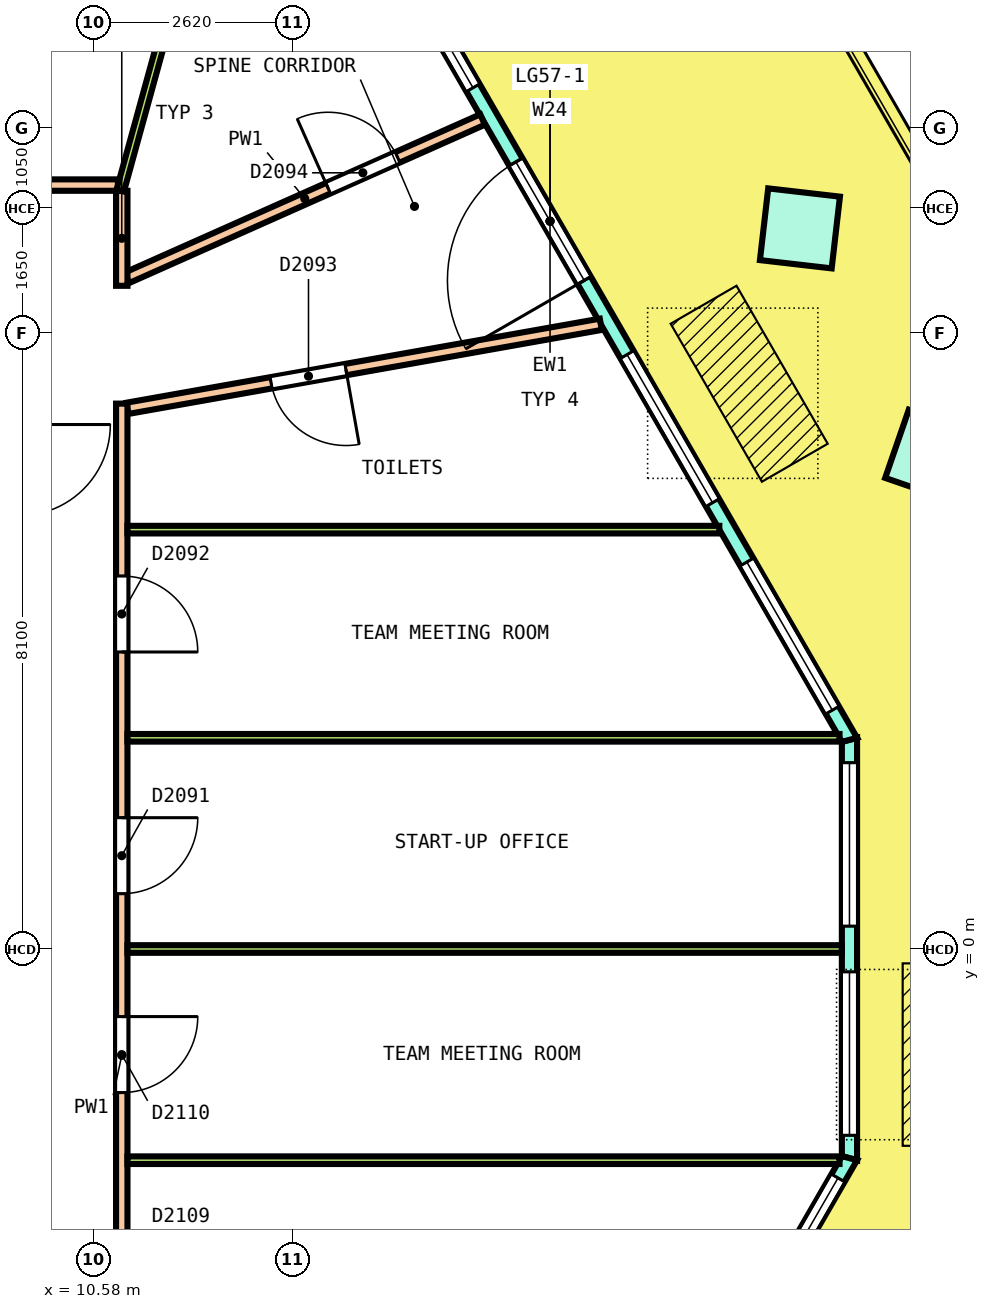
"""IFC4 building model, lengths in metres.
Left out: names, types, materials, properties, quantities, classifications, styles, units other than length and angle.
Written with IfcOpenShell. Run it as: python <this file> out.ifc"""

import sys

from ifc_helpers import new_model, si_unit, direction, frame, frame_2d, origin, origin_2d, place, context, subcontext, project, spatial, polyline, rectangle, outline, extrude, element, fill, save


model = new_model("IFC4")
c1 = context("Model", 3, precision=1e-05, world=origin(), true_north=direction((0.0, 1.0)))
c2 = subcontext(c1, "Body", "Model", "MODEL_VIEW")
j1 = project(units=[si_unit("LENGTHUNIT", "METRE"), si_unit("PLANEANGLEUNIT", "RADIAN")], contexts=[c1])
p1 = place(None, origin())
s1 = spatial("IfcSite", under=j1, at=p1, CompositionType="ELEMENT")
p2 = place(p1, origin())
s2 = spatial("IfcBuilding", under=s1, at=p2, CompositionType="ELEMENT")
p3 = place(p2, frame((0.0, 0.0, 263.0)))
s3 = spatial("IfcBuildingStorey", under=s2, at=p3, CompositionType="ELEMENT", Elevation=263.0)
p4 = place(p3, frame((21.598, 6.491, 0.0), z_axis=(0.021793949015, 0.025136579231, 0.999446434868), x_axis=(-0.500091550798, 0.865904279016, -0.010872920625)))
e1 = element("IfcColumn", 1, at=p4, inside=s3, PredefinedType="COLUMN", context=c2, shape_type="SweptSolid", body=[
    extrude(rectangle(XDim=0.95, YDim=0.95, at=origin_2d()), origin(), (0.0, 0.0, 1.0), 3.652),
])
p5 = place(p3, frame((19.872, 9.48, 0.0), z_axis=(0.025338523594, 0.018853466104, 0.999501128583), x_axis=(-0.501175757197, 0.865337954228, -0.003617370643)))
e2 = element("IfcColumn", 2, at=p5, inside=s3, PredefinedType="COLUMN", context=c2, shape_type="SweptSolid", body=[
    extrude(rectangle(XDim=0.95, YDim=0.95, at=origin_2d()), origin(), (0.0, 0.0, 1.0), 3.652),
])
p6 = place(p3, frame((20.524, -2.752, 0.0), z_axis=(0.0, 0.0, 1.0), x_axis=(0.0, 1.0, 0.0)))
e3 = element("IfcWall", 3, at=p6, inside=s3, PredefinedType="SOLIDWALL", context=c2, shape_type="SweptSolid", body=[
    extrude(outline(polyline([(-0.027, -0.1), (1.084, -0.1), (2.196, -0.1), (3.307, -0.1), (4.419, -0.1), (5.53, -0.1), (5.477, 0.1), (4.387, 0.1), (3.297, 0.1), (2.207, 0.1), (1.117, 0.1), (0.027, 0.1), (-0.027, -0.1)])), origin(), (0.0, 0.0, 1.0), 3.7),
])
p7 = place(p6, frame((0.301, 0.0, 0.1)))
e4 = element("IfcOpeningElement", 4, at=p7, cuts=e3, PredefinedType="OPENING", context=c2, shape_type="SweptSolid", body=[
    extrude(rectangle(XDim=2.15, YDim=2.75, at=frame_2d((1.075, 1.375))), frame((0.0, 0.11, 0.0), z_axis=(0.0, -1.0, 0.0), x_axis=(1.0, 0.0, 0.0)), (0.0, 0.0, 1.0), 0.22),
])
p8 = place(p6, frame((3.052, 0.0, 0.1)))
e5 = element("IfcOpeningElement", 5, at=p8, cuts=e3, PredefinedType="OPENING", context=c2, shape_type="SweptSolid", body=[
    extrude(rectangle(XDim=2.15, YDim=2.75, at=frame_2d((1.075, 1.375))), frame((0.0, 0.11, 0.0), z_axis=(0.0, -1.0, 0.0), x_axis=(1.0, 0.0, 0.0)), (0.0, 0.0, 1.0), 0.22),
])
p9 = place(p3, frame((20.524, 2.752, 0.0), z_axis=(0.0, 0.0, 1.0), x_axis=(-0.499993368965, 0.86602923218, 0.0)))
e6 = element("IfcWall", 6, at=p9, inside=s3, PredefinedType="SOLIDWALL", context=c2, shape_type="SweptSolid", body=[
    extrude(outline(polyline([(-0.027, -0.1), (1.027, -0.1), (2.081, -0.1), (3.135, -0.1), (4.189, -0.1), (5.244, -0.1), (6.298, -0.1), (7.352, -0.1), (8.406, -0.1), (9.46, -0.1), (10.514, -0.1), (11.568, -0.1), (12.622, -0.1), (13.676, -0.1), (14.73, -0.1), (15.784, -0.1), (15.731, 0.1), (14.684, 0.1), (13.637, 0.1), (12.59, 0.1), (11.543, 0.1), (10.496, 0.1), (9.449, 0.1), (8.402, 0.1), (7.355, 0.1), (6.308, 0.1), (5.261, 0.1), (4.215, 0.1), (3.168, 0.1), (2.121, 0.1), (1.074, 0.1), (0.027, 0.1), (-0.027, -0.1)])), origin(), (0.0, 0.0, 1.0), 3.7),
])
p10 = place(p9, frame((0.451, 0.0, 0.1)))
e7 = element("IfcOpeningElement", 7, at=p10, cuts=e6, PredefinedType="OPENING", context=c2, shape_type="SweptSolid", body=[
    extrude(rectangle(XDim=2.25, YDim=2.75, at=frame_2d((1.125, 1.375))), frame((0.0, 0.11, 0.0), z_axis=(0.0, -1.0, 0.0), x_axis=(1.0, 0.0, 0.0)), (0.0, 0.0, 1.0), 0.22),
])
p11 = place(p9, frame((3.602, 0.0, 0.1)))
e8 = element("IfcOpeningElement", 8, at=p11, cuts=e6, PredefinedType="OPENING", context=c2, shape_type="SweptSolid", body=[
    extrude(rectangle(XDim=2.25, YDim=2.75, at=frame_2d((1.125, 1.375))), frame((0.0, 0.11, 0.0), z_axis=(0.0, -1.0, 0.0), x_axis=(1.0, 0.0, 0.0)), (0.0, 0.0, 1.0), 0.22),
])
p12 = place(p9, frame((6.979, 0.0, 0.0)))
e9 = element("IfcOpeningElement", 9, at=p12, cuts=e6, PredefinedType="OPENING", context=c2, shape_type="SweptSolid", body=[
    extrude(rectangle(XDim=1.8, YDim=2.4, at=frame_2d((0.9, 1.2))), frame((0.0, 0.11, 0.0), z_axis=(0.0, -1.0, 0.0), x_axis=(1.0, 0.0, 0.0)), (0.0, 0.0, 1.0), 0.22),
])
p13 = place(p9, frame((6.979, 0.0, 2.55)))
e10 = element("IfcOpeningElement", 10, at=p13, cuts=e6, PredefinedType="OPENING", context=c2, shape_type="SweptSolid", body=[
    extrude(rectangle(XDim=1.8, YDim=0.3, at=frame_2d((0.9, 0.15))), frame((0.0, 0.11, 0.0), z_axis=(0.0, -1.0, 0.0), x_axis=(1.0, 0.0, 0.0)), (0.0, 0.0, 1.0), 0.22),
])
p14 = place(p9, frame((9.906, 0.0, 0.1)))
e11 = element("IfcOpeningElement", 11, at=p14, cuts=e6, PredefinedType="OPENING", context=c2, shape_type="SweptSolid", body=[
    extrude(rectangle(XDim=2.25, YDim=2.75, at=frame_2d((1.125, 1.375))), frame((0.0, 0.11, 0.0), z_axis=(0.0, -1.0, 0.0), x_axis=(1.0, 0.0, 0.0)), (0.0, 0.0, 1.0), 0.22),
])
p15 = place(p9, frame((13.057, 0.0, 0.1)))
e12 = element("IfcOpeningElement", 12, at=p15, cuts=e6, PredefinedType="OPENING", context=c2, shape_type="SweptSolid", body=[
    extrude(rectangle(XDim=2.25, YDim=2.75, at=frame_2d((1.125, 1.375))), frame((0.0, 0.11, 0.0), z_axis=(0.0, -1.0, 0.0), x_axis=(1.0, 0.0, 0.0)), (0.0, 0.0, 1.0), 0.22),
])
p16 = place(p3, frame((12.645, -16.398, 0.0), z_axis=(0.0, 0.0, 1.0), x_axis=(0.499993368965, 0.86602923218, 0.0)))
e13 = element("IfcWall", 13, at=p16, inside=s3, PredefinedType="SOLIDWALL", context=c2, shape_type="SweptSolid", body=[
    extrude(outline(polyline([(-0.027, -0.1), (1.027, -0.1), (2.081, -0.1), (3.135, -0.1), (4.189, -0.1), (5.244, -0.1), (6.298, -0.1), (7.352, -0.1), (8.406, -0.1), (9.46, -0.1), (10.514, -0.1), (11.568, -0.1), (12.622, -0.1), (13.676, -0.1), (14.73, -0.1), (15.784, -0.1), (15.731, 0.1), (14.684, 0.1), (13.637, 0.1), (12.59, 0.1), (11.543, 0.1), (10.496, 0.1), (9.449, 0.1), (8.402, 0.1), (7.355, 0.1), (6.308, 0.1), (5.261, 0.1), (4.215, 0.1), (3.168, 0.1), (2.121, 0.1), (1.074, 0.1), (0.027, 0.1), (-0.027, -0.1)])), origin(), (0.0, 0.0, 1.0), 3.7),
])
p17 = place(p16, frame((0.301, 0.0, 0.1)))
e14 = element("IfcOpeningElement", 14, at=p17, cuts=e13, PredefinedType="OPENING", context=c2, shape_type="SweptSolid", body=[
    extrude(rectangle(XDim=2.55, YDim=2.75, at=frame_2d((1.275, 1.375))), frame((0.0, 0.11, 0.0), z_axis=(0.0, -1.0, 0.0), x_axis=(1.0, 0.0, 0.0)), (0.0, 0.0, 1.0), 0.22),
])
p18 = place(p16, frame((3.452, 0.0, 0.1)))
e15 = element("IfcOpeningElement", 15, at=p18, cuts=e13, PredefinedType="OPENING", context=c2, shape_type="SweptSolid", body=[
    extrude(rectangle(XDim=2.55, YDim=2.75, at=frame_2d((1.275, 1.375))), frame((0.0, 0.11, 0.0), z_axis=(0.0, -1.0, 0.0), x_axis=(1.0, 0.0, 0.0)), (0.0, 0.0, 1.0), 0.22),
])
p19 = place(p16, frame((6.979, 0.0, 0.0)))
e16 = element("IfcOpeningElement", 16, at=p19, cuts=e13, PredefinedType="OPENING", context=c2, shape_type="SweptSolid", body=[
    extrude(rectangle(XDim=1.8, YDim=2.4, at=frame_2d((0.9, 1.2))), frame((0.0, 0.11, 0.0), z_axis=(0.0, -1.0, 0.0), x_axis=(1.0, 0.0, 0.0)), (0.0, 0.0, 1.0), 0.22),
])
p20 = place(p16, frame((6.979, 0.0, 2.55)))
e17 = element("IfcOpeningElement", 17, at=p20, cuts=e13, PredefinedType="OPENING", context=c2, shape_type="SweptSolid", body=[
    extrude(rectangle(XDim=1.8, YDim=0.3, at=frame_2d((0.9, 0.15))), frame((0.0, 0.11, 0.0), z_axis=(0.0, -1.0, 0.0), x_axis=(1.0, 0.0, 0.0)), (0.0, 0.0, 1.0), 0.22),
])
p21 = place(p16, frame((9.755, 0.0, 0.1)))
e18 = element("IfcOpeningElement", 18, at=p21, cuts=e13, PredefinedType="OPENING", context=c2, shape_type="SweptSolid", body=[
    extrude(rectangle(XDim=2.55, YDim=2.75, at=frame_2d((1.275, 1.375))), frame((0.0, 0.11, 0.0), z_axis=(0.0, -1.0, 0.0), x_axis=(1.0, 0.0, 0.0)), (0.0, 0.0, 1.0), 0.22),
])
p22 = place(p16, frame((12.907, 0.0, 0.1)))
e19 = element("IfcOpeningElement", 19, at=p22, cuts=e13, PredefinedType="OPENING", context=c2, shape_type="SweptSolid", body=[
    extrude(rectangle(XDim=2.55, YDim=2.75, at=frame_2d((1.275, 1.375))), frame((0.0, 0.11, 0.0), z_axis=(0.0, -1.0, 0.0), x_axis=(1.0, 0.0, 0.0)), (0.0, 0.0, 1.0), 0.22),
])
p23 = place(p3, frame((11.024, 7.113, 0.0), z_axis=(0.0, 0.0, 1.0), x_axis=(0.984612128706, 0.174753987095, 0.0)))
e20 = element("IfcWall", 20, at=p23, inside=s3, PredefinedType="PARTITIONING", context=c2, shape_type="SweptSolid", body=[
    extrude(rectangle(XDim=6.326, YDim=0.15, at=frame_2d((3.163, 0.0))), origin(), (0.0, 0.0, 1.0), 2.9),
])
p24 = place(p23, frame((1.92, 0.0, 0.0)))
e21 = element("IfcOpeningElement", 21, at=p24, cuts=e20, PredefinedType="OPENING", context=c2, shape_type="SweptSolid", body=[
    extrude(rectangle(XDim=1.0, YDim=2.1, at=frame_2d((0.5, 1.05))), frame((0.0, 0.085, 0.0), z_axis=(0.0, -1.0, 0.0), x_axis=(1.0, 0.0, 0.0)), (0.0, 0.0, 1.0), 0.17),
])
p25 = place(p3, frame((11.019, 8.831, 0.0), z_axis=(0.0, 0.0, 1.0), x_axis=(0.913606957834, 0.406598483269, 0.0)))
e22 = element("IfcWall", 22, at=p25, inside=s3, PredefinedType="PARTITIONING", context=c2, shape_type="SweptSolid", body=[
    extrude(rectangle(XDim=5.121, YDim=0.15, at=frame_2d((2.56, 0.0))), origin(), (0.0, 0.0, 1.0), 2.9),
])
p26 = place(p25, frame((2.897, 0.0, 0.0)))
e23 = element("IfcOpeningElement", 23, at=p26, cuts=e22, PredefinedType="OPENING", context=c2, shape_type="SweptSolid", body=[
    extrude(rectangle(XDim=1.0, YDim=2.1, at=frame_2d((0.5, 1.05))), frame((0.0, 0.085, 0.0), z_axis=(0.0, -1.0, 0.0), x_axis=(1.0, 0.0, 0.0)), (0.0, 0.0, 1.0), 0.17),
])
p27 = place(p3, frame((10.95, -9.975, 0.0), z_axis=(0.0, 0.0, 1.0), x_axis=(0.0, 1.0, 0.0)))
e24 = element("IfcWall", 24, at=p27, inside=s3, PredefinedType="PARTITIONING", context=c2, shape_type="SweptSolid", body=[
    extrude(rectangle(XDim=17.15, YDim=0.15, at=frame_2d((8.575, 0.0))), origin(), (0.0, 0.0, 1.0), 2.9),
])
p28 = place(p27, frame((10.702, 0.0, 0.0)))
e25 = element("IfcOpeningElement", 25, at=p28, cuts=e24, PredefinedType="OPENING", context=c2, shape_type="SweptSolid", body=[
    extrude(rectangle(XDim=1.0, YDim=2.1, at=frame_2d((0.5, 1.05))), frame((0.0, 0.085, 0.0), z_axis=(0.0, -1.0, 0.0), x_axis=(1.0, 0.0, 0.0)), (0.0, 0.0, 1.0), 0.17),
])
p29 = place(p27, frame((13.882, 0.0, 0.0)))
e26 = element("IfcOpeningElement", 26, at=p29, cuts=e24, PredefinedType="OPENING", context=c2, shape_type="SweptSolid", body=[
    extrude(rectangle(XDim=1.0, YDim=2.1, at=frame_2d((0.5, 1.05))), frame((0.0, 0.085, 0.0), z_axis=(0.0, -1.0, 0.0), x_axis=(1.0, 0.0, 0.0)), (0.0, 0.0, 1.0), 0.17),
])
p30 = place(p27, frame((2.744, 0.0, 0.0)))
e27 = element("IfcOpeningElement", 27, at=p30, cuts=e24, PredefinedType="OPENING", context=c2, shape_type="SweptSolid", body=[
    extrude(rectangle(XDim=1.0, YDim=2.1, at=frame_2d((0.5, 1.05))), frame((0.0, 0.085, 0.0), z_axis=(0.0, -1.0, 0.0), x_axis=(1.0, 0.0, 0.0)), (0.0, 0.0, 1.0), 0.17),
])
p31 = place(p27, frame((5.171, 0.0, 0.0)))
e28 = element("IfcOpeningElement", 28, at=p31, cuts=e24, PredefinedType="OPENING", context=c2, shape_type="SweptSolid", body=[
    extrude(rectangle(XDim=1.0, YDim=2.1, at=frame_2d((0.5, 1.05))), frame((0.0, 0.085, 0.0), z_axis=(0.0, -1.0, 0.0), x_axis=(1.0, 0.0, 0.0)), (0.0, 0.0, 1.0), 0.17),
])
p32 = place(p27, frame((8.086, 0.0, 0.0)))
e29 = element("IfcOpeningElement", 29, at=p32, cuts=e24, PredefinedType="OPENING", context=c2, shape_type="SweptSolid", body=[
    extrude(rectangle(XDim=1.0, YDim=2.1, at=frame_2d((0.5, 1.05))), frame((0.0, 0.085, 0.0), z_axis=(0.0, -1.0, 0.0), x_axis=(1.0, 0.0, 0.0)), (0.0, 0.0, 1.0), 0.17),
])
p33 = place(p3, frame((10.95, 8.725, 0.0), z_axis=(0.0, 0.0, 1.0), x_axis=(0.0, 1.0, 0.0)))
e30 = element("IfcWall", 30, at=p33, inside=s3, PredefinedType="PARTITIONING", context=c2, shape_type="SweptSolid", body=[
    extrude(rectangle(XDim=1.25, YDim=0.15, at=frame_2d((0.625, 0.0))), origin(), (0.0, 0.0, 1.0), 3.7),
])
p34 = place(p3, frame((-10.875, 10.05, 0.0), z_axis=(0.0, 0.0, 1.0), x_axis=(1.0, 0.0, 0.0)))
e31 = element("IfcWall", 31, at=p34, inside=s3, PredefinedType="PARTITIONING", context=c2, shape_type="SweptSolid", body=[
    extrude(rectangle(XDim=21.775, YDim=0.15, at=frame_2d((10.887, 0.0))), origin(), (0.0, 0.0, 1.0), 2.9),
])
p35 = place(p34, frame((16.885, 0.0, 0.0)))
e32 = element("IfcOpeningElement", 32, at=p35, cuts=e31, PredefinedType="OPENING", context=c2, shape_type="SweptSolid", body=[
    extrude(rectangle(XDim=1.2, YDim=2.1, at=frame_2d((0.6, 1.05))), frame((0.0, 0.085, 0.0), z_axis=(0.0, -1.0, 0.0), x_axis=(1.0, 0.0, 0.0)), (0.0, 0.0, 1.0), 0.17),
])
p36 = place(p34, frame((13.903, 0.0, 0.0)))
e33 = element("IfcOpeningElement", 33, at=p36, cuts=e31, PredefinedType="OPENING", context=c2, shape_type="SweptSolid", body=[
    extrude(rectangle(XDim=1.0, YDim=2.1, at=frame_2d((0.5, 1.05))), frame((0.0, 0.085, 0.0), z_axis=(0.0, -1.0, 0.0), x_axis=(1.0, 0.0, 0.0)), (0.0, 0.0, 1.0), 0.17),
])
p37 = place(p34, frame((7.638, 0.0, 0.0)))
e34 = element("IfcOpeningElement", 34, at=p37, cuts=e31, PredefinedType="OPENING", context=c2, shape_type="SweptSolid", body=[
    extrude(rectangle(XDim=1.0, YDim=2.1, at=frame_2d((0.5, 1.05))), frame((0.0, 0.085, 0.0), z_axis=(0.0, -1.0, 0.0), x_axis=(1.0, 0.0, 0.0)), (0.0, 0.0, 1.0), 0.17),
])
p38 = place(p34, frame((4.416, 0.0, 0.0)))
e35 = element("IfcOpeningElement", 35, at=p38, cuts=e31, PredefinedType="OPENING", context=c2, shape_type="SweptSolid", body=[
    extrude(rectangle(XDim=1.0, YDim=2.1, at=frame_2d((0.5, 1.05))), frame((0.0, 0.085, 0.0), z_axis=(0.0, -1.0, 0.0), x_axis=(1.0, 0.0, 0.0)), (0.0, 0.0, 1.0), 0.17),
])
p39 = place(p34, frame((1.372, 0.0, 0.0)))
e36 = element("IfcOpeningElement", 36, at=p39, cuts=e31, PredefinedType="OPENING", context=c2, shape_type="SweptSolid", body=[
    extrude(rectangle(XDim=1.0, YDim=2.1, at=frame_2d((0.5, 1.05))), frame((0.0, 0.085, 0.0), z_axis=(0.0, -1.0, 0.0), x_axis=(1.0, 0.0, 0.0)), (0.0, 0.0, 1.0), 0.17),
])
p40 = place(p3, frame((11.025, 2.779, 0.0), z_axis=(0.0, 0.0, 1.0), x_axis=(1.0, 0.0, 0.0)))
e37 = element("IfcWall", 37, at=p40, inside=s3, PredefinedType="PARTITIONING", context=c2, shape_type="SweptSolid", body=[
    extrude(rectangle(XDim=9.368, YDim=0.1, at=frame_2d((4.684, 0.0))), origin(), (0.0, 0.0, 1.0), 2.9),
])
p41 = place(p3, frame((11.025, 0.0, 0.0), z_axis=(0.0, 0.0, 1.0), x_axis=(1.0, 0.0, 0.0)))
e38 = element("IfcWall", 38, at=p41, inside=s3, PredefinedType="PARTITIONING", context=c2, shape_type="SweptSolid", body=[
    extrude(rectangle(XDim=9.399, YDim=0.1, at=frame_2d((4.699, 0.0))), origin(), (0.0, 0.0, 1.0), 2.9),
])
p42 = place(p3, frame((11.025, 5.517, 0.0), z_axis=(0.0, 0.0, 1.0), x_axis=(1.0, 0.0, 0.0)))
e39 = element("IfcWall", 39, at=p42, inside=s3, PredefinedType="PARTITIONING", context=c2, shape_type="SweptSolid", body=[
    extrude(rectangle(XDim=7.787, YDim=0.1, at=frame_2d((3.894, 0.0))), origin(), (0.0, 0.0, 1.0), 2.9),
])
p43 = place(p3, frame((10.93, 9.978, 0.0), z_axis=(0.0, 0.0, 1.0), x_axis=(0.265456257417, 0.964122904716, 0.0)))
e40 = element("IfcWall", 40, at=p43, inside=s3, PredefinedType="PARTITIONING", context=c2, shape_type="SweptSolid", body=[
    extrude(rectangle(XDim=6.455, YDim=0.1, at=frame_2d((3.227, 0.0))), origin(), (0.0, 0.0, 1.0), 2.9),
])
p44 = place(p3, frame((11.025, -2.779, 0.0), z_axis=(0.0, 0.0, 1.0), x_axis=(1.0, 0.0, 0.0)))
e41 = element("IfcWall", 41, at=p44, inside=s3, PredefinedType="PARTITIONING", context=c2, shape_type="SweptSolid", body=[
    extrude(rectangle(XDim=9.368, YDim=0.1, at=frame_2d((4.684, 0.0))), origin(), (0.0, 0.0, 1.0), 2.9),
])
p45 = place(p7, origin())
e42 = element("IfcWindow", 42, at=p45, inside=s3, PartitioningType="SINGLE_PANEL", PredefinedType="WINDOW", context=c2, shape_type="SweptSolid", body=[
    extrude(rectangle(XDim=2.15, YDim=2.75, at=frame_2d((1.075, 1.375))), frame((0.0, 0.03, 0.0), z_axis=(0.0, -1.0, 0.0), x_axis=(1.0, 0.0, 0.0)), (0.0, 0.0, 1.0), 0.06),
])
fill(e4, e42)
p46 = place(p8, origin())
e43 = element("IfcWindow", 43, at=p46, inside=s3, PartitioningType="SINGLE_PANEL", PredefinedType="WINDOW", context=c2, shape_type="SweptSolid", body=[
    extrude(rectangle(XDim=2.15, YDim=2.75, at=frame_2d((1.075, 1.375))), frame((0.0, 0.03, 0.0), z_axis=(0.0, -1.0, 0.0), x_axis=(1.0, 0.0, 0.0)), (0.0, 0.0, 1.0), 0.06),
])
fill(e5, e43)
p47 = place(p10, origin())
e44 = element("IfcWindow", 44, at=p47, inside=s3, PartitioningType="SINGLE_PANEL", PredefinedType="WINDOW", context=c2, shape_type="SweptSolid", body=[
    extrude(rectangle(XDim=2.25, YDim=2.75, at=frame_2d((1.125, 1.375))), frame((0.0, 0.03, 0.0), z_axis=(0.0, -1.0, 0.0), x_axis=(1.0, 0.0, 0.0)), (0.0, 0.0, 1.0), 0.06),
])
fill(e7, e44)
p48 = place(p11, origin())
e45 = element("IfcWindow", 45, at=p48, inside=s3, PartitioningType="SINGLE_PANEL", PredefinedType="WINDOW", context=c2, shape_type="SweptSolid", body=[
    extrude(rectangle(XDim=2.25, YDim=2.75, at=frame_2d((1.125, 1.375))), frame((0.0, 0.03, 0.0), z_axis=(0.0, -1.0, 0.0), x_axis=(1.0, 0.0, 0.0)), (0.0, 0.0, 1.0), 0.06),
])
fill(e8, e45)
p49 = place(p12, origin())
e46 = element("IfcDoor", 46, at=p49, inside=s3, OperationType="DOUBLE_DOOR_SINGLE_SWING", PredefinedType="DOOR", context=c2, shape_type="SweptSolid", body=[
    extrude(rectangle(XDim=1.8, YDim=2.4, at=frame_2d((0.9, 1.2))), frame((0.0, 0.025, 0.0), z_axis=(0.0, -1.0, 0.0), x_axis=(1.0, 0.0, 0.0)), (0.0, 0.0, 1.0), 0.05),
])
fill(e9, e46)
p50 = place(p13, origin())
e47 = element("IfcWindow", 47, at=p50, inside=s3, PartitioningType="SINGLE_PANEL", PredefinedType="WINDOW", context=c2, shape_type="SweptSolid", body=[
    extrude(rectangle(XDim=1.8, YDim=0.3, at=frame_2d((0.9, 0.15))), frame((0.0, 0.03, 0.0), z_axis=(0.0, -1.0, 0.0), x_axis=(1.0, 0.0, 0.0)), (0.0, 0.0, 1.0), 0.06),
])
fill(e10, e47)
p51 = place(p14, origin())
e48 = element("IfcWindow", 48, at=p51, inside=s3, PartitioningType="SINGLE_PANEL", PredefinedType="WINDOW", context=c2, shape_type="SweptSolid", body=[
    extrude(rectangle(XDim=2.25, YDim=2.75, at=frame_2d((1.125, 1.375))), frame((0.0, 0.03, 0.0), z_axis=(0.0, -1.0, 0.0), x_axis=(1.0, 0.0, 0.0)), (0.0, 0.0, 1.0), 0.06),
])
fill(e11, e48)
p52 = place(p22, origin())
e49 = element("IfcWindow", 49, at=p52, inside=s3, PartitioningType="SINGLE_PANEL", PredefinedType="WINDOW", context=c2, shape_type="SweptSolid", body=[
    extrude(rectangle(XDim=2.55, YDim=2.75, at=frame_2d((1.275, 1.375))), frame((0.0, 0.03, 0.0), z_axis=(0.0, -1.0, 0.0), x_axis=(1.0, 0.0, 0.0)), (0.0, 0.0, 1.0), 0.06),
])
fill(e19, e49)
p53 = place(p28, origin())
e50 = element("IfcDoor", 50, at=p53, inside=s3, OperationType="SINGLE_SWING_LEFT", PredefinedType="DOOR", context=c2, shape_type="SweptSolid", body=[
    extrude(rectangle(XDim=1.0, YDim=2.1, at=frame_2d((0.5, 1.05))), frame((0.0, 0.025, 0.0), z_axis=(0.0, -1.0, 0.0), x_axis=(1.0, 0.0, 0.0)), (0.0, 0.0, 1.0), 0.05),
])
fill(e25, e50)
p54 = place(p29, origin())
e51 = element("IfcDoor", 51, at=p54, inside=s3, OperationType="SINGLE_SWING_LEFT", PredefinedType="DOOR", context=c2, shape_type="SweptSolid", body=[
    extrude(rectangle(XDim=1.0, YDim=2.1, at=frame_2d((0.5, 1.05))), frame((0.0, 0.025, 0.0), z_axis=(0.0, -1.0, 0.0), x_axis=(1.0, 0.0, 0.0)), (0.0, 0.0, 1.0), 0.05),
])
fill(e26, e51)
p55 = place(p24, origin())
e52 = element("IfcDoor", 52, at=p55, inside=s3, OperationType="SINGLE_SWING_RIGHT", PredefinedType="DOOR", context=c2, shape_type="SweptSolid", body=[
    extrude(rectangle(XDim=1.0, YDim=2.1, at=frame_2d((0.5, 1.05))), frame((0.0, 0.025, 0.0), z_axis=(0.0, -1.0, 0.0), x_axis=(1.0, 0.0, 0.0)), (0.0, 0.0, 1.0), 0.05),
])
fill(e21, e52)
p56 = place(p26, origin())
e53 = element("IfcDoor", 53, at=p56, inside=s3, OperationType="SINGLE_SWING_LEFT", PredefinedType="DOOR", context=c2, shape_type="SweptSolid", body=[
    extrude(rectangle(XDim=1.0, YDim=2.1, at=frame_2d((0.5, 1.05))), frame((0.0, 0.025, 0.0), z_axis=(0.0, -1.0, 0.0), x_axis=(1.0, 0.0, 0.0)), (0.0, 0.0, 1.0), 0.05),
])
fill(e23, e53)
p57 = place(p32, origin())
e54 = element("IfcDoor", 54, at=p57, inside=s3, OperationType="SINGLE_SWING_LEFT", PredefinedType="DOOR", context=c2, shape_type="SweptSolid", body=[
    extrude(rectangle(XDim=1.0, YDim=2.1, at=frame_2d((0.5, 1.05))), frame((0.0, 0.025, 0.0), z_axis=(0.0, -1.0, 0.0), x_axis=(1.0, 0.0, 0.0)), (0.0, 0.0, 1.0), 0.05),
])
fill(e29, e54)
save(model, sys.argv[1])
